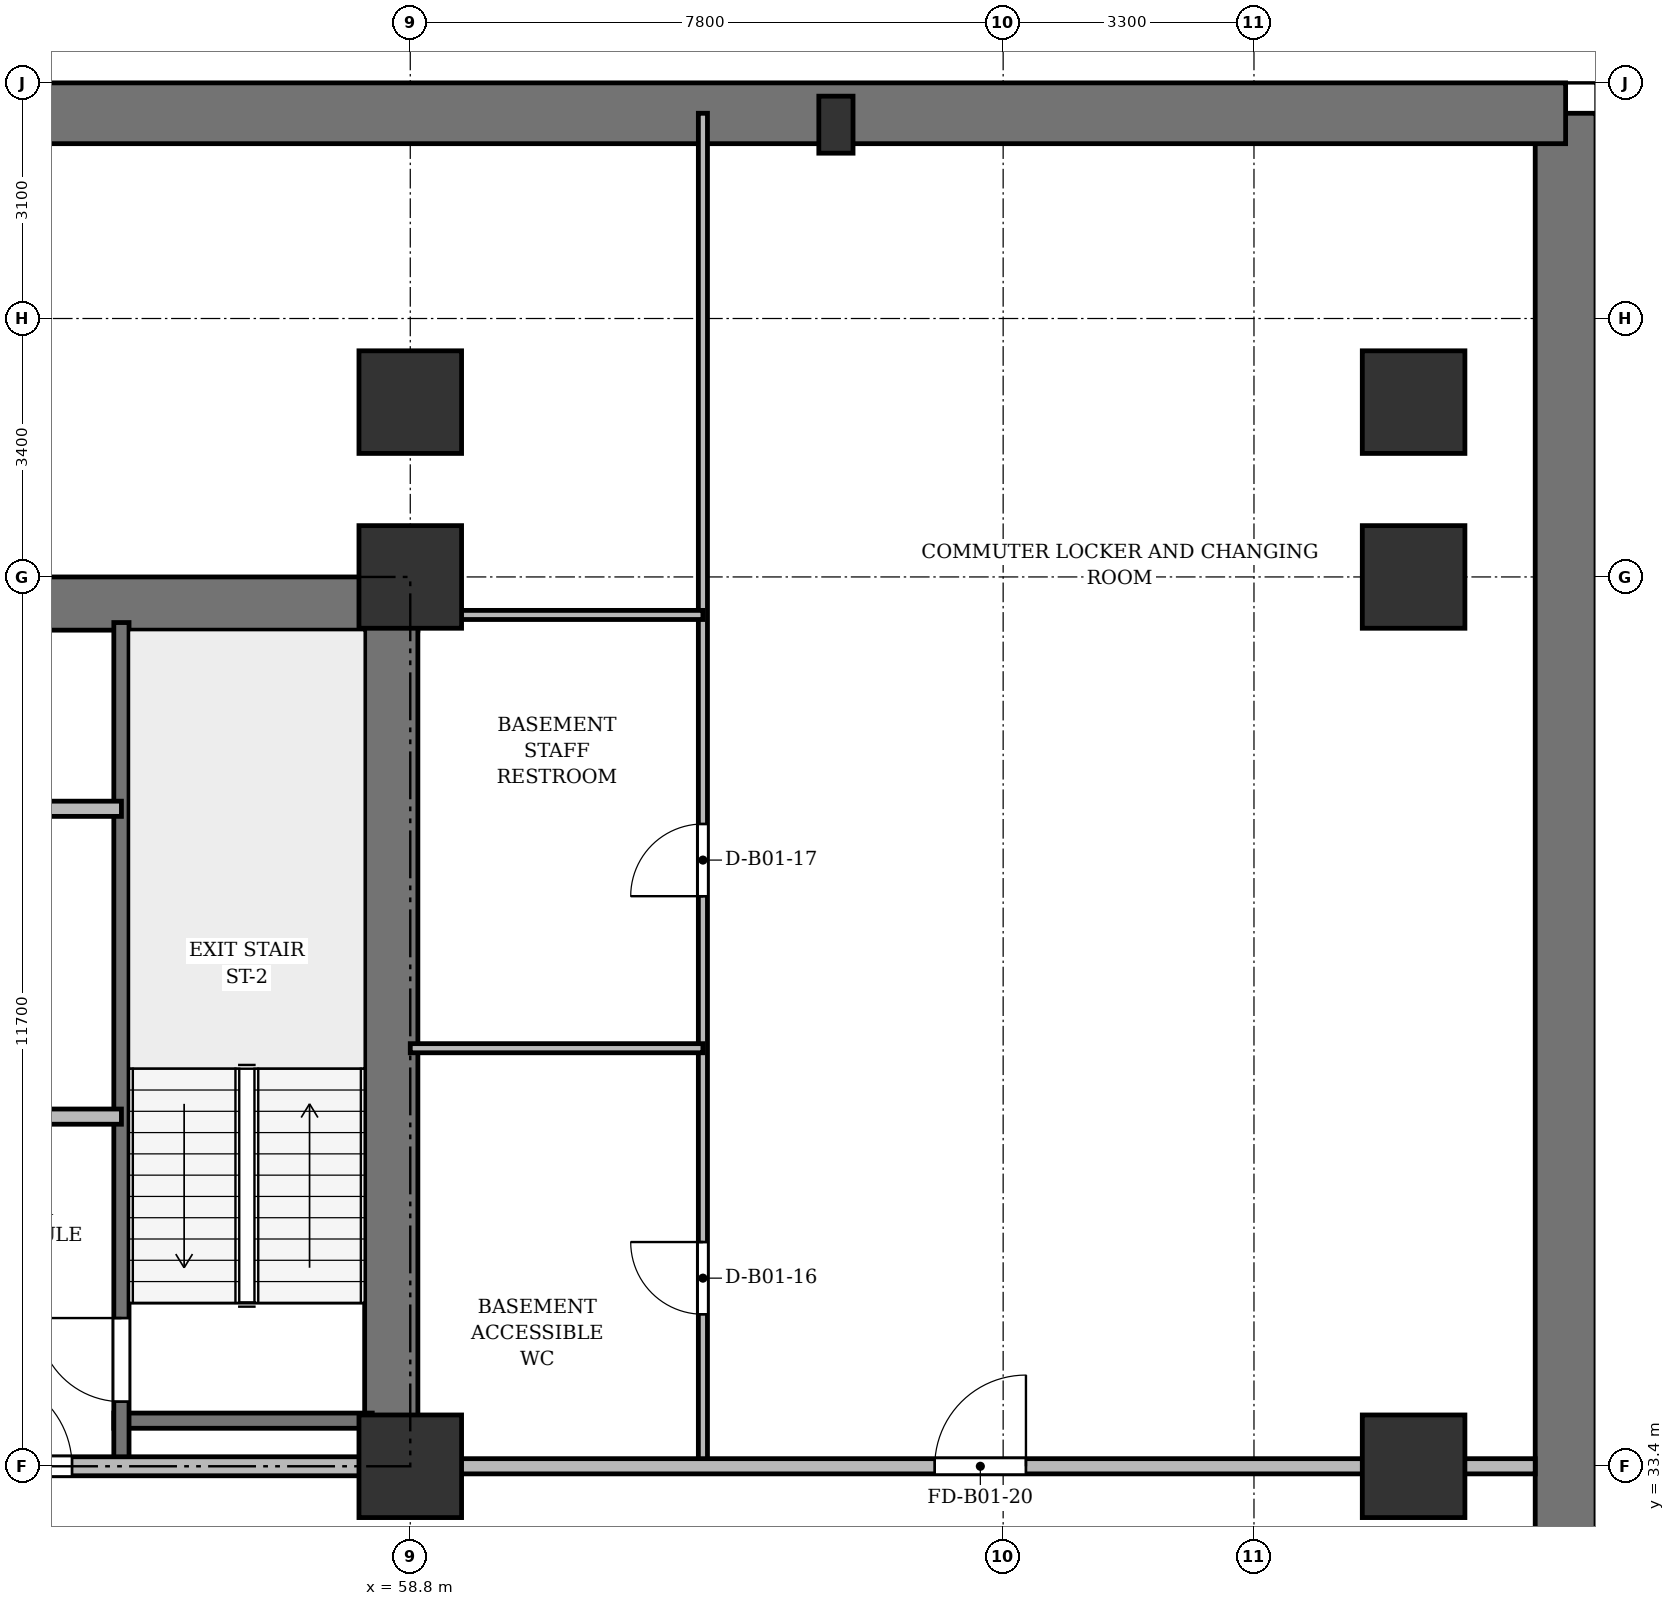
"""IFC4 building model, lengths in metres.
Left out: names, types, materials, properties, quantities, classifications, styles, units other than length and angle.
Written with IfcOpenShell. Run it as: python <this file> out.ifc"""

import sys

from ifc_helpers import new_model, si_unit, direction, frame, frame_2d, origin, origin_2d, place, context, subcontext, project, spatial, rectangle, extrude, source, transform, mapped, element, fill, save


model = new_model("IFC4")
c1 = context("Model", 3, precision=1e-05, world=origin(), true_north=direction((0.0, 1.0)))
c2 = subcontext(c1, "Body", "Model", "MODEL_VIEW")
j1 = project(units=[si_unit("LENGTHUNIT", "METRE"), si_unit("PLANEANGLEUNIT", "RADIAN")], contexts=[c1])
p1 = place(None, origin())
s1 = spatial("IfcSite", under=j1, at=p1, CompositionType="ELEMENT")
p2 = place(p1, origin())
s2 = spatial("IfcBuilding", under=s1, at=p2, CompositionType="ELEMENT")
p3 = place(p2, frame((0.0, 0.0, -4.3)))
s3 = spatial("IfcBuildingStorey", under=s2, at=p3, CompositionType="ELEMENT", Elevation=-4.3)
m1 = source(origin(), c2, "Body", "SweptSolid", [
    extrude(rectangle(XDim=1.35, YDim=1.35, at=origin_2d()), origin(), (0.0, 0.0, 1.0), 4.3),
])
for number, where, z_axis, x_axis in (
    (1, (58.8, 33.4, 0.0), (0.0, 0.0, 1.0), (1.0, 0.0, 0.0)),
    (2, (58.8, 45.1, 0.0), (0.0, 0.0, 1.0), (1.0, 0.0, 0.0)),
    (3, (58.8, 47.4, 0.0), (0.0, 0.0, 1.0), (1.0, 0.0, 0.0)),
    (4, (72.0, 33.4, 0.0), (0.0, 0.0, 1.0), (1.0, 0.0, 0.0)),
    (5, (72.0, 45.1, 0.0), (0.0, 0.0, 1.0), (1.0, 0.0, 0.0)),
    (6, (72.0, 47.4, 0.0), (0.0, 0.0, 1.0), (1.0, 0.0, 0.0)),
):
    element("IfcColumn", number, at=place(p3, frame(where, z_axis=z_axis, x_axis=x_axis)), inside=s3, PredefinedType="COLUMN", context=c2, shape_type="MappedRepresentation", body=[
        mapped(m1, transform((0.0, 0.0, 0.0), x_axis=(1.0, 0.0, 0.0), y_axis=(0.0, 1.0, 0.0), z_axis=(0.0, 0.0, 1.0), scale=1.0)),
    ])
m2 = source(origin(), c2, "Body", "SweptSolid", [
    extrude(rectangle(XDim=0.45, YDim=0.75, at=origin_2d()), origin(), (0.0, 0.0, 1.0), 4.3),
])
p4 = place(p3, frame((64.4, 51.05, 0.0), z_axis=(0.0, 0.0, 1.0), x_axis=(1.0, 0.0, 0.0)))
e7 = element("IfcColumn", 7, at=p4, inside=s3, PredefinedType="PILASTER", context=c2, shape_type="MappedRepresentation", body=[
    mapped(m2, transform((0.0, 0.0, 0.0), x_axis=(1.0, 0.0, 0.0), y_axis=(0.0, 1.0, 0.0), z_axis=(0.0, 0.0, 1.0), scale=1.0)),
])
p5 = place(p3, frame((74.0, 0.4, 0.0), z_axis=(0.0, 0.0, 1.0), x_axis=(0.0, 1.0, 0.0)))
e8 = element("IfcWall", 8, at=p5, inside=s3, PredefinedType="USERDEFINED", context=c2, shape_type="SweptSolid", body=[
    extrude(rectangle(XDim=50.8, YDim=0.8, at=frame_2d((25.4, 0.0))), origin(), (0.0, 0.0, 1.0), 3.94),
])
p6 = place(p3, frame((74.0, 51.2, 0.0), z_axis=(0.0, 0.0, 1.0), x_axis=(-1.0, 0.0, 0.0)))
e9 = element("IfcWall", 9, at=p6, inside=s3, PredefinedType="USERDEFINED", context=c2, shape_type="SweptSolid", body=[
    extrude(rectangle(XDim=73.6, YDim=0.8, at=frame_2d((36.8, 0.0))), origin(), (0.0, 0.0, 1.0), 3.94),
])
p7 = place(p3, frame((15.5, 44.75, 0.0), z_axis=(0.0, 0.0, 1.0), x_axis=(1.0, 0.0, 0.0)))
e10 = element("IfcWall", 10, at=p7, inside=s3, PredefinedType="SHEAR", context=c2, shape_type="SweptSolid", body=[
    extrude(rectangle(XDim=43.4, YDim=0.7, at=frame_2d((21.7, 0.0))), origin(), (0.0, 0.0, 1.0), 3.94),
])
p8 = place(p3, frame((58.55, 33.4, 0.0), z_axis=(0.0, 0.0, 1.0), x_axis=(0.0, 1.0, 0.0)))
e11 = element("IfcWall", 11, at=p8, inside=s3, PredefinedType="SHEAR", context=c2, shape_type="SweptSolid", body=[
    extrude(rectangle(XDim=11.7, YDim=0.7, at=frame_2d((5.85, 0.0))), origin(), (0.0, 0.0, 1.0), 3.94),
])
p9 = place(p3, frame((54.9, 34.0, 0.0), z_axis=(0.0, 0.0, 1.0), x_axis=(1.0, 0.0, 0.0)))
e12 = element("IfcWall", 12, at=p9, inside=s3, PredefinedType="SHEAR", context=c2, shape_type="SweptSolid", body=[
    extrude(rectangle(XDim=3.4, YDim=0.2, at=frame_2d((1.7, 0.0))), origin(), (0.0, 0.0, 1.0), 3.94),
])
p10 = place(p3, frame((55.0, 33.4, 0.0), z_axis=(0.0, 0.0, 1.0), x_axis=(0.0, 1.0, 0.0)))
e13 = element("IfcWall", 13, at=p10, inside=s3, PredefinedType="SHEAR", context=c2, shape_type="SweptSolid", body=[
    extrude(rectangle(XDim=11.1, YDim=0.2, at=frame_2d((5.55, 0.0))), origin(), (0.0, 0.0, 1.0), 3.94),
])
p11 = place(p10, frame((0.85, 0.0, 0.0)))
e14 = element("IfcOpeningElement", 14, at=p11, cuts=e13, PredefinedType="OPENING", context=c2, shape_type="SweptSolid", body=[
    extrude(rectangle(XDim=1.1, YDim=2.15, at=frame_2d((0.55, 1.075))), frame((0.0, 0.11, 0.0), z_axis=(0.0, -1.0, 0.0), x_axis=(1.0, 0.0, 0.0)), (0.0, 0.0, 1.0), 0.22),
])
p12 = place(p3, frame((47.15, 42.05, 0.0), z_axis=(0.0, 0.0, 1.0), x_axis=(1.0, 0.0, 0.0)))
e15 = element("IfcWall", 15, at=p12, inside=s3, PredefinedType="SOLIDWALL", context=c2, shape_type="SweptSolid", body=[
    extrude(rectangle(XDim=7.85, YDim=0.2, at=frame_2d((3.925, 0.0))), origin(), (0.0, 0.0, 1.0), 3.94),
])
p13 = place(p12, frame((0.75, 0.0, 0.0)))
e16 = element("IfcOpeningElement", 16, at=p13, cuts=e15, PredefinedType="OPENING", context=c2, shape_type="SweptSolid", body=[
    extrude(rectangle(XDim=0.9, YDim=2.1, at=frame_2d((0.45, 1.05))), frame((0.0, 0.11, 0.0), z_axis=(0.0, -1.0, 0.0), x_axis=(1.0, 0.0, 0.0)), (0.0, 0.0, 1.0), 0.22),
])
p14 = place(p12, frame((3.85, 0.0, 0.0)))
e17 = element("IfcOpeningElement", 17, at=p14, cuts=e15, PredefinedType="OPENING", context=c2, shape_type="SweptSolid", body=[
    extrude(rectangle(XDim=0.9, YDim=2.1, at=frame_2d((0.45, 1.05))), frame((0.0, 0.11, 0.0), z_axis=(0.0, -1.0, 0.0), x_axis=(1.0, 0.0, 0.0)), (0.0, 0.0, 1.0), 0.22),
])
p15 = place(p3, frame((52.45, 38.0, 0.0), z_axis=(0.0, 0.0, 1.0), x_axis=(1.0, 0.0, 0.0)))
e18 = element("IfcWall", 18, at=p15, inside=s3, PredefinedType="PARTITIONING", context=c2, shape_type="SweptSolid", body=[
    extrude(rectangle(XDim=2.55, YDim=0.2, at=frame_2d((1.275, 0.0))), origin(), (0.0, 0.0, 1.0), 3.94),
])
p16 = place(p3, frame((47.15, 33.4, 0.0), z_axis=(0.0, 0.0, 1.0), x_axis=(1.0, 0.0, 0.0)))
e19 = element("IfcWall", 19, at=p16, inside=s3, PredefinedType="PARTITIONING", context=c2, shape_type="SweptSolid", body=[
    extrude(rectangle(XDim=11.15, YDim=0.25, at=frame_2d((5.575, 0.0))), origin(), (0.0, 0.0, 1.0), 3.24),
])
p17 = place(p16, frame((0.7, 0.0, 0.0)))
e20 = element("IfcOpeningElement", 20, at=p17, cuts=e19, PredefinedType="OPENING", context=c2, shape_type="SweptSolid", body=[
    extrude(rectangle(XDim=0.95, YDim=2.15, at=frame_2d((0.475, 1.075))), frame((0.0, 0.135, 0.0), z_axis=(0.0, -1.0, 0.0), x_axis=(1.0, 0.0, 0.0)), (0.0, 0.0, 1.0), 0.27),
])
p18 = place(p16, frame((6.0, 0.0, 0.0)))
e21 = element("IfcOpeningElement", 21, at=p18, cuts=e19, PredefinedType="OPENING", context=c2, shape_type="SweptSolid", body=[
    extrude(rectangle(XDim=1.2, YDim=2.15, at=frame_2d((0.6, 1.075))), frame((0.0, 0.135, 0.0), z_axis=(0.0, -1.0, 0.0), x_axis=(1.0, 0.0, 0.0)), (0.0, 0.0, 1.0), 0.27),
])
p19 = place(p3, frame((62.65, 33.4, 0.0), z_axis=(0.0, 0.0, 1.0), x_axis=(0.0, 1.0, 0.0)))
e22 = element("IfcWall", 22, at=p19, inside=s3, PredefinedType="PARTITIONING", context=c2, shape_type="SweptSolid", body=[
    extrude(rectangle(XDim=17.8, YDim=0.12, at=frame_2d((8.9, 0.0))), origin(), (0.0, 0.0, 1.0), 3.24),
])
p20 = place(p19, frame((2.0, 0.0, 0.0)))
e23 = element("IfcOpeningElement", 23, at=p20, cuts=e22, PredefinedType="OPENING", context=c2, shape_type="SweptSolid", body=[
    extrude(rectangle(XDim=0.95, YDim=2.15, at=frame_2d((0.475, 1.075))), frame((0.0, 0.07, 0.0), z_axis=(0.0, -1.0, 0.0), x_axis=(1.0, 0.0, 0.0)), (0.0, 0.0, 1.0), 0.14),
])
p21 = place(p19, frame((7.5, 0.0, 0.0)))
e24 = element("IfcOpeningElement", 24, at=p21, cuts=e22, PredefinedType="OPENING", context=c2, shape_type="SweptSolid", body=[
    extrude(rectangle(XDim=0.95, YDim=2.15, at=frame_2d((0.475, 1.075))), frame((0.0, 0.07, 0.0), z_axis=(0.0, -1.0, 0.0), x_axis=(1.0, 0.0, 0.0)), (0.0, 0.0, 1.0), 0.14),
])
for number, where, z_axis, x_axis in (
    (25, (58.8, 38.9, 0.0), (0.0, 0.0, 1.0), (1.0, 0.0, 0.0)),
    (26, (58.8, 44.6, 0.0), (0.0, 0.0, 1.0), (1.0, 0.0, 0.0)),
):
    element("IfcWall", number, at=place(p3, frame(where, z_axis=z_axis, x_axis=x_axis)), inside=s3, PredefinedType="PARTITIONING", context=c2, shape_type="SweptSolid", body=[
        extrude(rectangle(XDim=3.85, YDim=0.12, at=frame_2d((1.925, 0.0))), origin(), (0.0, 0.0, 1.0), 3.29),
    ])
p22 = place(p3, frame((58.5, 33.4, 0.0), z_axis=(0.0, 0.0, 1.0), x_axis=(1.0, 0.0, 0.0)))
e27 = element("IfcWall", 27, at=p22, inside=s3, PredefinedType="PARTITIONING", context=c2, shape_type="SweptSolid", body=[
    extrude(rectangle(XDim=15.1, YDim=0.2, at=frame_2d((7.55, 0.0))), origin(), (0.0, 0.0, 1.0), 3.24),
])
p23 = place(p22, frame((7.2, 0.0, 0.0)))
e28 = element("IfcOpeningElement", 28, at=p23, cuts=e27, PredefinedType="OPENING", context=c2, shape_type="SweptSolid", body=[
    extrude(rectangle(XDim=1.2, YDim=2.15, at=frame_2d((0.6, 1.075))), frame((0.0, 0.11, 0.0), z_axis=(0.0, -1.0, 0.0), x_axis=(1.0, 0.0, 0.0)), (0.0, 0.0, 1.0), 0.22),
])
m3 = source(origin(), c2, "Body", "SweptSolid", [
    extrude(rectangle(XDim=1.1, YDim=2.15, at=frame_2d((0.55, 1.075))), frame((0.0, 0.025, 0.0), z_axis=(0.0, -1.0, 0.0), x_axis=(1.0, 0.0, 0.0)), (0.0, 0.0, 1.0), 0.05),
])
p24 = place(p11, origin())
e29 = element("IfcDoor", 29, at=p24, inside=s3, OperationType="SINGLE_SWING_RIGHT", PredefinedType="DOOR", context=c2, shape_type="MappedRepresentation", body=[
    mapped(m3, transform((0.0, 0.0, 0.0), x_axis=(1.0, 0.0, 0.0), y_axis=(0.0, 1.0, 0.0), z_axis=(0.0, 0.0, 1.0), scale=1.0)),
])
fill(e14, e29)
m4 = source(origin(), c2, "Body", "SweptSolid", [
    extrude(rectangle(XDim=1.2, YDim=2.15, at=frame_2d((0.6, 1.075))), frame((0.0, 0.025, 0.0), z_axis=(0.0, -1.0, 0.0), x_axis=(1.0, 0.0, 0.0)), (0.0, 0.0, 1.0), 0.05),
])
p25 = place(p18, origin())
e30 = element("IfcDoor", 30, at=p25, inside=s3, OperationType="SINGLE_SWING_LEFT", PredefinedType="DOOR", context=c2, shape_type="MappedRepresentation", body=[
    mapped(m4, transform((0.0, 0.0, 0.0), x_axis=(1.0, 0.0, 0.0), y_axis=(0.0, 1.0, 0.0), z_axis=(0.0, 0.0, 1.0), scale=1.0)),
])
fill(e21, e30)
m5 = source(origin(), c2, "Body", "SweptSolid", [
    extrude(rectangle(XDim=0.95, YDim=2.15, at=frame_2d((0.475, 1.075))), frame((0.0, 0.025, 0.0), z_axis=(0.0, -1.0, 0.0), x_axis=(1.0, 0.0, 0.0)), (0.0, 0.0, 1.0), 0.05),
])
p26 = place(p20, origin())
e31 = element("IfcDoor", 31, at=p26, inside=s3, OperationType="SINGLE_SWING_RIGHT", PredefinedType="DOOR", context=c2, shape_type="MappedRepresentation", body=[
    mapped(m5, transform((0.0, 0.0, 0.0), x_axis=(1.0, 0.0, 0.0), y_axis=(0.0, 1.0, 0.0), z_axis=(0.0, 0.0, 1.0), scale=1.0)),
])
fill(e23, e31)
p27 = place(p21, origin())
e32 = element("IfcDoor", 32, at=p27, inside=s3, OperationType="SINGLE_SWING_LEFT", PredefinedType="DOOR", context=c2, shape_type="MappedRepresentation", body=[
    mapped(m5, transform((0.0, 0.0, 0.0), x_axis=(1.0, 0.0, 0.0), y_axis=(0.0, 1.0, 0.0), z_axis=(0.0, 0.0, 1.0), scale=1.0)),
])
fill(e24, e32)
p28 = place(p23, origin())
e33 = element("IfcDoor", 33, at=p28, inside=s3, OperationType="SINGLE_SWING_RIGHT", PredefinedType="DOOR", context=c2, shape_type="MappedRepresentation", body=[
    mapped(m4, transform((0.0, 0.0, 0.0), x_axis=(1.0, 0.0, 0.0), y_axis=(0.0, 1.0, 0.0), z_axis=(0.0, 0.0, 1.0), scale=1.0)),
])
fill(e28, e33)
save(model, sys.argv[1])
